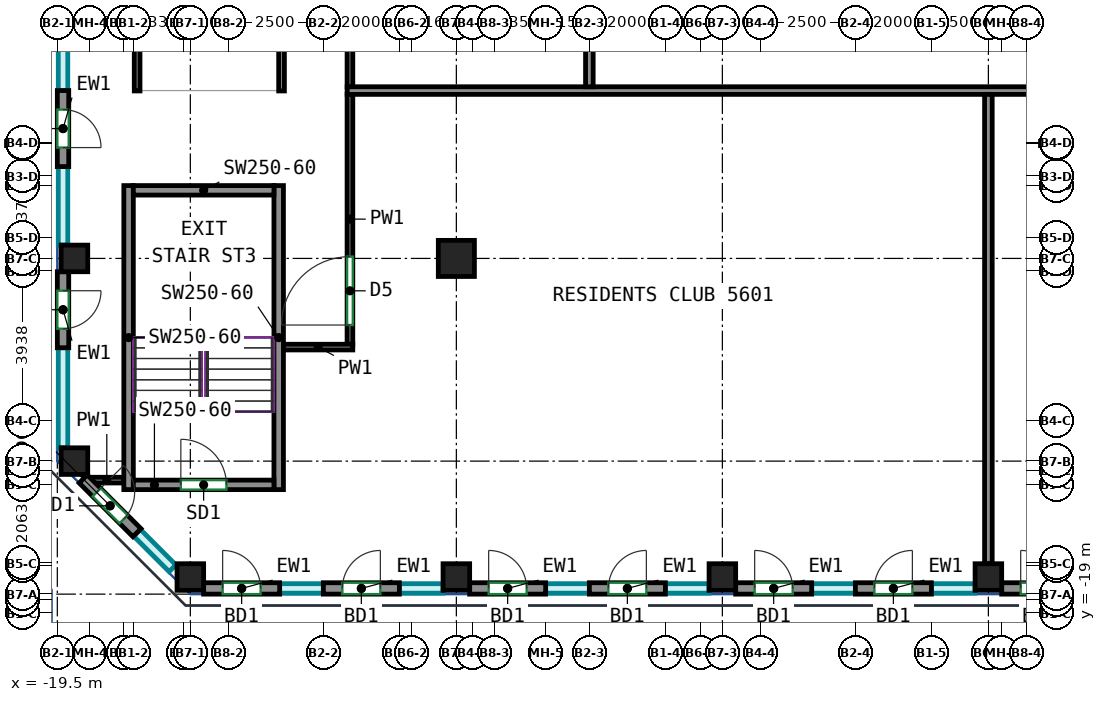
"""IFC4 building model, lengths in metres.
Left out: names, types, materials, properties, quantities, classifications, styles, units other than length and angle.
Written with IfcOpenShell. Run it as: python <this file> out.ifc"""

import sys

from ifc_helpers import new_model, si_unit, direction, frame, frame_2d, origin, origin_2d, place, context, subcontext, project, spatial, rectangle, extrude, source, transform, mapped, element, fill, save


model = new_model("IFC4")
c1 = context("Model", 3, precision=1e-05, world=origin(), true_north=direction((0.0, 1.0)))
c2 = subcontext(c1, "Body", "Model", "MODEL_VIEW")
j1 = project(units=[si_unit("LENGTHUNIT", "METRE"), si_unit("PLANEANGLEUNIT", "RADIAN")], contexts=[c1])
p1 = place(None, origin())
s1 = spatial("IfcSite", under=j1, at=p1, CompositionType="ELEMENT")
p2 = place(p1, origin())
s2 = spatial("IfcBuilding", under=s1, at=p2, CompositionType="ELEMENT")
p3 = place(p2, frame((0.0, 0.0, 233.6)))
s3 = spatial("IfcBuildingStorey", under=s2, at=p3, CompositionType="ELEMENT", Elevation=233.6)
m1 = source(origin(), c2, "Body", "SweptSolid", [
    extrude(rectangle(XDim=0.7, YDim=0.7, at=origin_2d()), origin(), (0.0, 0.0, 1.0), 5.12),
])
for number, where, z_axis, x_axis in (
    (1, (-19.05, -15.0, 0.0), (0.0, 0.0, 1.0), (1.0, 0.0, 0.0)),
    (2, (-19.05, -9.667, 0.0), (0.0, 0.0, 1.0), (1.0, 0.0, 0.0)),
    (3, (-16.0, -18.05, 0.0), (0.0, 0.0, 1.0), (1.0, 0.0, 0.0)),
    (4, (-9.0, -18.05, 0.0), (0.0, 0.0, 1.0), (1.0, 0.0, 0.0)),
):
    element("IfcColumn", number, at=place(p3, frame(where, z_axis=z_axis, x_axis=x_axis)), inside=s3, PredefinedType="COLUMN", context=c2, shape_type="MappedRepresentation", body=[
        mapped(m1, transform((0.0, 0.0, 0.0))),
    ])
m2 = source(origin(), c2, "Body", "SweptSolid", [
    extrude(rectangle(XDim=0.95, YDim=0.95, at=origin_2d()), origin(), (0.0, 0.0, 1.0), 5.12),
])
p4 = place(p3, frame((-9.0, -9.667, 0.0), z_axis=(0.0, 0.0, 1.0), x_axis=(1.0, 0.0, 0.0)))
e5 = element("IfcColumn", 5, at=p4, inside=s3, PredefinedType="COLUMN", context=c2, shape_type="MappedRepresentation", body=[
    mapped(m2, transform((0.0, 0.0, 0.0))),
])
for number, where, z_axis, x_axis in (
    (6, (-2.0, -18.05, 0.0), (0.0, 0.0, 1.0), (1.0, 0.0, 0.0)),
    (7, (5.0, -18.05, 0.0), (0.0, 0.0, 1.0), (1.0, 0.0, 0.0)),
):
    element("IfcColumn", number, at=place(p3, frame(where, z_axis=z_axis, x_axis=x_axis)), inside=s3, PredefinedType="COLUMN", context=c2, shape_type="MappedRepresentation", body=[
        mapped(m1, transform((0.0, 0.0, 0.0))),
    ])
m3 = source(origin(), c2, "Body", "SweptSolid", [
    extrude(rectangle(XDim=8.0, YDim=0.25, at=frame_2d((4.0, 0.0))), origin(), (0.0, 0.0, 1.0), 5.12),
])
for number, where, z_axis, x_axis in (
    (8, (-17.625, -15.75, 0.0), (0.0, 0.0, 1.0), (0.0, 1.0, 0.0)),
    (9, (-13.675, -15.75, 0.0), (0.0, 0.0, 1.0), (0.0, 1.0, 0.0)),
):
    element("IfcWall", number, at=place(p3, frame(where, z_axis=z_axis, x_axis=x_axis)), inside=s3, PredefinedType="SHEAR", context=c2, shape_type="MappedRepresentation", body=[
        mapped(m3, transform((0.0, 0.0, 0.0))),
    ])
m4 = source(origin(), c2, "Body", "SweptSolid", [
    extrude(rectangle(XDim=3.7, YDim=0.25, at=frame_2d((1.85, 0.0))), origin(), (0.0, 0.0, 1.0), 5.12),
])
p5 = place(p3, frame((-17.5, -15.625, 0.0), z_axis=(0.0, 0.0, 1.0), x_axis=(1.0, 0.0, 0.0)))
e10 = element("IfcWall", 10, at=p5, inside=s3, PredefinedType="SHEAR", context=c2, shape_type="MappedRepresentation", body=[
    mapped(m4, transform((0.0, 0.0, 0.0))),
])
p6 = place(p5, frame((1.25, 0.0, 0.0)))
e11 = element("IfcOpeningElement", 11, at=p6, cuts=e10, PredefinedType="OPENING", context=c2, shape_type="SweptSolid", body=[
    extrude(rectangle(XDim=1.2, YDim=2.1, at=frame_2d((0.6, 1.05))), frame((0.0, 0.135, 0.0), z_axis=(0.0, -1.0, 0.0), x_axis=(1.0, 0.0, 0.0)), (0.0, 0.0, 1.0), 0.27),
])
p7 = place(p3, frame((-17.5, -7.875, 0.0), z_axis=(0.0, 0.0, 1.0), x_axis=(1.0, 0.0, 0.0)))
e12 = element("IfcWall", 12, at=p7, inside=s3, PredefinedType="SHEAR", context=c2, shape_type="MappedRepresentation", body=[
    mapped(m4, transform((0.0, 0.0, 0.0))),
])
m5 = source(origin(), c2, "Body", "SweptSolid", [
    extrude(rectangle(XDim=2.0, YDim=0.3, at=frame_2d((1.0, 0.0))), origin(), (0.0, 0.0, 1.0), 5.12),
])
p8 = place(p3, frame((-15.65, -18.35, 0.0), z_axis=(0.0, 0.0, 1.0), x_axis=(1.0, 0.0, 0.0)))
e13 = element("IfcWall", 13, at=p8, inside=s3, PredefinedType="SOLIDWALL", context=c2, shape_type="MappedRepresentation", body=[
    mapped(m5, transform((0.0, 0.0, 0.0))),
])
p9 = place(p8, frame((0.5, 0.0, 0.0)))
e14 = element("IfcOpeningElement", 14, at=p9, cuts=e13, PredefinedType="OPENING", context=c2, shape_type="SweptSolid", body=[
    extrude(rectangle(XDim=1.0, YDim=2.1, at=frame_2d((0.5, 1.05))), frame((0.0, 0.16, 0.0), z_axis=(0.0, -1.0, 0.0), x_axis=(1.0, 0.0, 0.0)), (0.0, 0.0, 1.0), 0.32),
])
p10 = place(p3, frame((-12.5, -18.35, 0.0), z_axis=(0.0, 0.0, 1.0), x_axis=(1.0, 0.0, 0.0)))
e15 = element("IfcWall", 15, at=p10, inside=s3, PredefinedType="SOLIDWALL", context=c2, shape_type="MappedRepresentation", body=[
    mapped(m5, transform((0.0, 0.0, 0.0))),
])
p11 = place(p10, frame((0.5, 0.0, 0.0)))
e16 = element("IfcOpeningElement", 16, at=p11, cuts=e15, PredefinedType="OPENING", context=c2, shape_type="SweptSolid", body=[
    extrude(rectangle(XDim=1.0, YDim=2.1, at=frame_2d((0.5, 1.05))), frame((0.0, 0.16, 0.0), z_axis=(0.0, -1.0, 0.0), x_axis=(1.0, 0.0, 0.0)), (0.0, 0.0, 1.0), 0.32),
])
p12 = place(p3, frame((-8.65, -18.35, 0.0), z_axis=(0.0, 0.0, 1.0), x_axis=(1.0, 0.0, 0.0)))
e17 = element("IfcWall", 17, at=p12, inside=s3, PredefinedType="SOLIDWALL", context=c2, shape_type="MappedRepresentation", body=[
    mapped(m5, transform((0.0, 0.0, 0.0))),
])
p13 = place(p12, frame((0.5, 0.0, 0.0)))
e18 = element("IfcOpeningElement", 18, at=p13, cuts=e17, PredefinedType="OPENING", context=c2, shape_type="SweptSolid", body=[
    extrude(rectangle(XDim=1.0, YDim=2.1, at=frame_2d((0.5, 1.05))), frame((0.0, 0.16, 0.0), z_axis=(0.0, -1.0, 0.0), x_axis=(1.0, 0.0, 0.0)), (0.0, 0.0, 1.0), 0.32),
])
p14 = place(p3, frame((-5.5, -18.35, 0.0), z_axis=(0.0, 0.0, 1.0), x_axis=(1.0, 0.0, 0.0)))
e19 = element("IfcWall", 19, at=p14, inside=s3, PredefinedType="SOLIDWALL", context=c2, shape_type="MappedRepresentation", body=[
    mapped(m5, transform((0.0, 0.0, 0.0))),
])
p15 = place(p14, frame((0.5, 0.0, 0.0)))
e20 = element("IfcOpeningElement", 20, at=p15, cuts=e19, PredefinedType="OPENING", context=c2, shape_type="SweptSolid", body=[
    extrude(rectangle(XDim=1.0, YDim=2.1, at=frame_2d((0.5, 1.05))), frame((0.0, 0.16, 0.0), z_axis=(0.0, -1.0, 0.0), x_axis=(1.0, 0.0, 0.0)), (0.0, 0.0, 1.0), 0.32),
])
p16 = place(p3, frame((-1.65, -18.35, 0.0), z_axis=(0.0, 0.0, 1.0), x_axis=(1.0, 0.0, 0.0)))
e21 = element("IfcWall", 21, at=p16, inside=s3, PredefinedType="SOLIDWALL", context=c2, shape_type="MappedRepresentation", body=[
    mapped(m5, transform((0.0, 0.0, 0.0))),
])
p17 = place(p16, frame((0.5, 0.0, 0.0)))
e22 = element("IfcOpeningElement", 22, at=p17, cuts=e21, PredefinedType="OPENING", context=c2, shape_type="SweptSolid", body=[
    extrude(rectangle(XDim=1.0, YDim=2.1, at=frame_2d((0.5, 1.05))), frame((0.0, 0.16, 0.0), z_axis=(0.0, -1.0, 0.0), x_axis=(1.0, 0.0, 0.0)), (0.0, 0.0, 1.0), 0.32),
])
p18 = place(p3, frame((1.5, -18.35, 0.0), z_axis=(0.0, 0.0, 1.0), x_axis=(1.0, 0.0, 0.0)))
e23 = element("IfcWall", 23, at=p18, inside=s3, PredefinedType="SOLIDWALL", context=c2, shape_type="MappedRepresentation", body=[
    mapped(m5, transform((0.0, 0.0, 0.0))),
])
p19 = place(p18, frame((0.5, 0.0, 0.0)))
e24 = element("IfcOpeningElement", 24, at=p19, cuts=e23, PredefinedType="OPENING", context=c2, shape_type="SweptSolid", body=[
    extrude(rectangle(XDim=1.0, YDim=2.1, at=frame_2d((0.5, 1.05))), frame((0.0, 0.16, 0.0), z_axis=(0.0, -1.0, 0.0), x_axis=(1.0, 0.0, 0.0)), (0.0, 0.0, 1.0), 0.32),
])
p20 = place(p3, frame((5.35, -18.35, 0.0), z_axis=(0.0, 0.0, 1.0), x_axis=(1.0, 0.0, 0.0)))
e25 = element("IfcWall", 25, at=p20, inside=s3, PredefinedType="SOLIDWALL", context=c2, shape_type="MappedRepresentation", body=[
    mapped(m5, transform((0.0, 0.0, 0.0))),
])
p21 = place(p20, frame((0.5, 0.0, 0.0)))
e26 = element("IfcOpeningElement", 26, at=p21, cuts=e25, PredefinedType="OPENING", context=c2, shape_type="SweptSolid", body=[
    extrude(rectangle(XDim=1.0, YDim=2.1, at=frame_2d((0.5, 1.05))), frame((0.0, 0.16, 0.0), z_axis=(0.0, -1.0, 0.0), x_axis=(1.0, 0.0, 0.0)), (0.0, 0.0, 1.0), 0.32),
])
p22 = place(p3, frame((-19.35, -5.25, 0.0), z_axis=(0.0, 0.0, 1.0), x_axis=(0.0, -1.0, 0.0)))
e27 = element("IfcWall", 27, at=p22, inside=s3, PredefinedType="SOLIDWALL", context=c2, shape_type="MappedRepresentation", body=[
    mapped(m5, transform((0.0, 0.0, 0.0))),
])
p23 = place(p22, frame((0.5, 0.0, 0.0)))
e28 = element("IfcOpeningElement", 28, at=p23, cuts=e27, PredefinedType="OPENING", context=c2, shape_type="SweptSolid", body=[
    extrude(rectangle(XDim=1.0, YDim=2.1, at=frame_2d((0.5, 1.05))), frame((0.0, 0.16, 0.0), z_axis=(0.0, -1.0, 0.0), x_axis=(1.0, 0.0, 0.0)), (0.0, 0.0, 1.0), 0.32),
])
p24 = place(p3, frame((-19.35, -10.017, 0.0), z_axis=(0.0, 0.0, 1.0), x_axis=(0.0, -1.0, 0.0)))
e29 = element("IfcWall", 29, at=p24, inside=s3, PredefinedType="SOLIDWALL", context=c2, shape_type="MappedRepresentation", body=[
    mapped(m5, transform((0.0, 0.0, 0.0))),
])
p25 = place(p24, frame((0.5, 0.0, 0.0)))
e30 = element("IfcOpeningElement", 30, at=p25, cuts=e29, PredefinedType="OPENING", context=c2, shape_type="SweptSolid", body=[
    extrude(rectangle(XDim=1.0, YDim=2.1, at=frame_2d((0.5, 1.05))), frame((0.0, 0.16, 0.0), z_axis=(0.0, -1.0, 0.0), x_axis=(1.0, 0.0, 0.0)), (0.0, 0.0, 1.0), 0.32),
])
p26 = place(p3, frame((-18.819, -15.469, 0.0), z_axis=(0.0, 0.0, 1.0), x_axis=(0.707045742145, -0.70716781496, 0.0)))
e31 = element("IfcWall", 31, at=p26, inside=s3, PredefinedType="SOLIDWALL", context=c2, shape_type="MappedRepresentation", body=[
    mapped(m5, transform((0.0, 0.0, 0.0))),
])
p27 = place(p26, frame((0.5, 0.0, 0.0)))
e32 = element("IfcOpeningElement", 32, at=p27, cuts=e31, PredefinedType="OPENING", context=c2, shape_type="SweptSolid", body=[
    extrude(rectangle(XDim=1.0, YDim=2.1, at=frame_2d((0.5, 1.05))), frame((0.0, 0.16, 0.0), z_axis=(0.0, -1.0, 0.0), x_axis=(1.0, 0.0, 0.0)), (0.0, 0.0, 1.0), 0.32),
])
p28 = place(p3, frame((-13.6, 2.85, 0.0), z_axis=(0.0, 0.0, 1.0), x_axis=(0.0, -1.0, 0.0)))
e33 = element("IfcWall", 33, at=p28, inside=s3, PredefinedType="PARTITIONING", context=c2, shape_type="SweptSolid", body=[
    extrude(rectangle(XDim=8.11, YDim=0.15, at=frame_2d((4.055, 0.0))), origin(), (0.0, 0.0, 1.0), 5.12),
])
p29 = place(p3, frame((-17.4, -5.26, 0.0), z_axis=(0.0, 0.0, 1.0), x_axis=(0.0, 1.0, 0.0)))
e34 = element("IfcWall", 34, at=p29, inside=s3, PredefinedType="PARTITIONING", context=c2, shape_type="SweptSolid", body=[
    extrude(rectangle(XDim=8.185, YDim=0.15, at=frame_2d((4.093, 0.0))), origin(), (0.0, 0.0, 1.0), 5.12),
])
p30 = place(p29, frame((5.667, 0.0, 0.0)))
e35 = element("IfcOpeningElement", 35, at=p30, cuts=e34, PredefinedType="OPENING", context=c2, shape_type="SweptSolid", body=[
    extrude(rectangle(XDim=0.9, YDim=2.1, at=frame_2d((0.45, 1.05))), frame((0.0, 0.085, 0.0), z_axis=(0.0, -1.0, 0.0), x_axis=(1.0, 0.0, 0.0)), (0.0, 0.0, 1.0), 0.17),
])
p31 = place(p3, frame((-11.8, -5.16, 0.0), z_axis=(0.0, 0.0, 1.0), x_axis=(0.0, 1.0, 0.0)))
e36 = element("IfcWall", 36, at=p31, inside=s3, PredefinedType="PARTITIONING", context=c2, shape_type="SweptSolid", body=[
    extrude(rectangle(XDim=5.435, YDim=0.15, at=frame_2d((2.717, 0.0))), origin(), (0.0, 0.0, 1.0), 5.12),
])
p32 = place(p3, frame((-11.8, -11.925, 0.0), z_axis=(0.0, 0.0, 1.0), x_axis=(0.0, 1.0, 0.0)))
e37 = element("IfcWall", 37, at=p32, inside=s3, PredefinedType="PARTITIONING", context=c2, shape_type="SweptSolid", body=[
    extrude(rectangle(XDim=6.585, YDim=0.15, at=frame_2d((3.292, 0.0))), origin(), (0.0, 0.0, 1.0), 5.12),
])
p33 = place(p32, frame((0.506, 0.0, 0.0)))
e38 = element("IfcOpeningElement", 38, at=p33, cuts=e37, PredefinedType="OPENING", context=c2, shape_type="SweptSolid", body=[
    extrude(rectangle(XDim=1.8, YDim=2.1, at=frame_2d((0.9, 1.05))), frame((0.0, 0.085, 0.0), z_axis=(0.0, -1.0, 0.0), x_axis=(1.0, 0.0, 0.0)), (0.0, 0.0, 1.0), 0.17),
])
p34 = place(p3, frame((-13.549, -12.0, 0.0), z_axis=(0.0, 0.0, 1.0), x_axis=(1.0, 0.0, 0.0)))
e39 = element("IfcWall", 39, at=p34, inside=s3, PredefinedType="PARTITIONING", context=c2, shape_type="SweptSolid", body=[
    extrude(rectangle(XDim=1.824, YDim=0.15, at=frame_2d((0.912, 0.0))), origin(), (0.0, 0.0, 1.0), 5.12),
])
p35 = place(p3, frame((-18.646, -15.5, 0.0), z_axis=(0.0, 0.0, 1.0), x_axis=(1.0, 0.0, 0.0)))
e40 = element("IfcWall", 40, at=p35, inside=s3, PredefinedType="PARTITIONING", context=c2, shape_type="SweptSolid", body=[
    extrude(rectangle(XDim=0.896, YDim=0.15, at=frame_2d((0.448, 0.0))), origin(), (0.0, 0.0, 1.0), 5.12),
])
p36 = place(p3, frame((-11.873, -5.25, 0.0), z_axis=(0.0, 0.0, 1.0), x_axis=(1.0, 0.0, 0.0)))
e41 = element("IfcWall", 41, at=p36, inside=s3, PredefinedType="PARTITIONING", context=c2, shape_type="SweptSolid", body=[
    extrude(rectangle(XDim=20.473, YDim=0.2, at=frame_2d((10.237, 0.0))), origin(), (0.0, 0.0, 1.0), 5.12),
])
p37 = place(p3, frame((-5.5, -5.15, 0.0), z_axis=(0.0, 0.0, 1.0), x_axis=(0.0, 1.0, 0.0)))
e42 = element("IfcWall", 42, at=p37, inside=s3, PredefinedType="PARTITIONING", context=c2, shape_type="SweptSolid", body=[
    extrude(rectangle(XDim=5.423, YDim=0.2, at=frame_2d((2.711, 0.0))), origin(), (0.0, 0.0, 1.0), 5.12),
])
p38 = place(p3, frame((5.0, -17.7, 0.0), z_axis=(0.0, 0.0, 1.0), x_axis=(0.0, 1.0, 0.0)))
e43 = element("IfcWall", 43, at=p38, inside=s3, PredefinedType="PARTITIONING", context=c2, shape_type="SweptSolid", body=[
    extrude(rectangle(XDim=12.35, YDim=0.2, at=frame_2d((6.175, 0.0))), origin(), (0.0, 0.0, 1.0), 5.12),
])
p39 = place(p9, origin())
e44 = element("IfcDoor", 44, at=p39, inside=s3, OperationType="SINGLE_SWING_LEFT", PredefinedType="DOOR", context=c2, shape_type="SweptSolid", body=[
    extrude(rectangle(XDim=1.0, YDim=2.1, at=frame_2d((0.5, 1.05))), frame((0.0, 0.025, 0.0), z_axis=(0.0, -1.0, 0.0), x_axis=(1.0, 0.0, 0.0)), (0.0, 0.0, 1.0), 0.05),
])
fill(e14, e44)
p40 = place(p11, origin())
e45 = element("IfcDoor", 45, at=p40, inside=s3, OperationType="SINGLE_SWING_RIGHT", PredefinedType="DOOR", context=c2, shape_type="SweptSolid", body=[
    extrude(rectangle(XDim=1.0, YDim=2.1, at=frame_2d((0.5, 1.05))), frame((0.0, 0.025, 0.0), z_axis=(0.0, -1.0, 0.0), x_axis=(1.0, 0.0, 0.0)), (0.0, 0.0, 1.0), 0.05),
])
fill(e16, e45)
p41 = place(p13, origin())
e46 = element("IfcDoor", 46, at=p41, inside=s3, OperationType="SINGLE_SWING_LEFT", PredefinedType="DOOR", context=c2, shape_type="SweptSolid", body=[
    extrude(rectangle(XDim=1.0, YDim=2.1, at=frame_2d((0.5, 1.05))), frame((0.0, 0.025, 0.0), z_axis=(0.0, -1.0, 0.0), x_axis=(1.0, 0.0, 0.0)), (0.0, 0.0, 1.0), 0.05),
])
fill(e18, e46)
p42 = place(p15, origin())
e47 = element("IfcDoor", 47, at=p42, inside=s3, OperationType="SINGLE_SWING_RIGHT", PredefinedType="DOOR", context=c2, shape_type="SweptSolid", body=[
    extrude(rectangle(XDim=1.0, YDim=2.1, at=frame_2d((0.5, 1.05))), frame((0.0, 0.025, 0.0), z_axis=(0.0, -1.0, 0.0), x_axis=(1.0, 0.0, 0.0)), (0.0, 0.0, 1.0), 0.05),
])
fill(e20, e47)
p43 = place(p17, origin())
e48 = element("IfcDoor", 48, at=p43, inside=s3, OperationType="SINGLE_SWING_LEFT", PredefinedType="DOOR", context=c2, shape_type="SweptSolid", body=[
    extrude(rectangle(XDim=1.0, YDim=2.1, at=frame_2d((0.5, 1.05))), frame((0.0, 0.025, 0.0), z_axis=(0.0, -1.0, 0.0), x_axis=(1.0, 0.0, 0.0)), (0.0, 0.0, 1.0), 0.05),
])
fill(e22, e48)
p44 = place(p19, origin())
e49 = element("IfcDoor", 49, at=p44, inside=s3, OperationType="SINGLE_SWING_RIGHT", PredefinedType="DOOR", context=c2, shape_type="SweptSolid", body=[
    extrude(rectangle(XDim=1.0, YDim=2.1, at=frame_2d((0.5, 1.05))), frame((0.0, 0.025, 0.0), z_axis=(0.0, -1.0, 0.0), x_axis=(1.0, 0.0, 0.0)), (0.0, 0.0, 1.0), 0.05),
])
fill(e24, e49)
p45 = place(p21, origin())
e50 = element("IfcDoor", 50, at=p45, inside=s3, OperationType="SINGLE_SWING_LEFT", PredefinedType="DOOR", context=c2, shape_type="SweptSolid", body=[
    extrude(rectangle(XDim=1.0, YDim=2.1, at=frame_2d((0.5, 1.05))), frame((0.0, 0.025, 0.0), z_axis=(0.0, -1.0, 0.0), x_axis=(1.0, 0.0, 0.0)), (0.0, 0.0, 1.0), 0.05),
])
fill(e26, e50)
p46 = place(p23, origin())
e51 = element("IfcDoor", 51, at=p46, inside=s3, OperationType="SINGLE_SWING_RIGHT", PredefinedType="DOOR", context=c2, shape_type="SweptSolid", body=[
    extrude(rectangle(XDim=1.0, YDim=2.1, at=frame_2d((0.5, 1.05))), frame((0.0, 0.025, 0.0), z_axis=(0.0, -1.0, 0.0), x_axis=(1.0, 0.0, 0.0)), (0.0, 0.0, 1.0), 0.05),
])
fill(e28, e51)
p47 = place(p25, origin())
e52 = element("IfcDoor", 52, at=p47, inside=s3, OperationType="SINGLE_SWING_LEFT", PredefinedType="DOOR", context=c2, shape_type="SweptSolid", body=[
    extrude(rectangle(XDim=1.0, YDim=2.1, at=frame_2d((0.5, 1.05))), frame((0.0, 0.025, 0.0), z_axis=(0.0, -1.0, 0.0), x_axis=(1.0, 0.0, 0.0)), (0.0, 0.0, 1.0), 0.05),
])
fill(e30, e52)
p48 = place(p27, origin())
e53 = element("IfcDoor", 53, at=p48, inside=s3, OperationType="SINGLE_SWING_LEFT", PredefinedType="DOOR", context=c2, shape_type="SweptSolid", body=[
    extrude(rectangle(XDim=1.0, YDim=2.1, at=frame_2d((0.5, 1.05))), frame((0.0, 0.025, 0.0), z_axis=(0.0, -1.0, 0.0), x_axis=(1.0, 0.0, 0.0)), (0.0, 0.0, 1.0), 0.05),
])
fill(e32, e53)
p49 = place(p6, origin())
e54 = element("IfcDoor", 54, at=p49, inside=s3, OperationType="DOUBLE_DOOR_SINGLE_SWING", PredefinedType="DOOR", context=c2, shape_type="SweptSolid", body=[
    extrude(rectangle(XDim=1.2, YDim=2.1, at=frame_2d((0.6, 1.05))), frame((0.0, 0.025, 0.0), z_axis=(0.0, -1.0, 0.0), x_axis=(1.0, 0.0, 0.0)), (0.0, 0.0, 1.0), 0.05),
])
fill(e11, e54)
p50 = place(p33, origin())
e55 = element("IfcDoor", 55, at=p50, inside=s3, OperationType="DOUBLE_DOOR_SINGLE_SWING", PredefinedType="DOOR", context=c2, shape_type="SweptSolid", body=[
    extrude(rectangle(XDim=1.8, YDim=2.1, at=frame_2d((0.9, 1.05))), frame((0.0, 0.025, 0.0), z_axis=(0.0, -1.0, 0.0), x_axis=(1.0, 0.0, 0.0)), (0.0, 0.0, 1.0), 0.05),
])
fill(e38, e55)
save(model, sys.argv[1])
